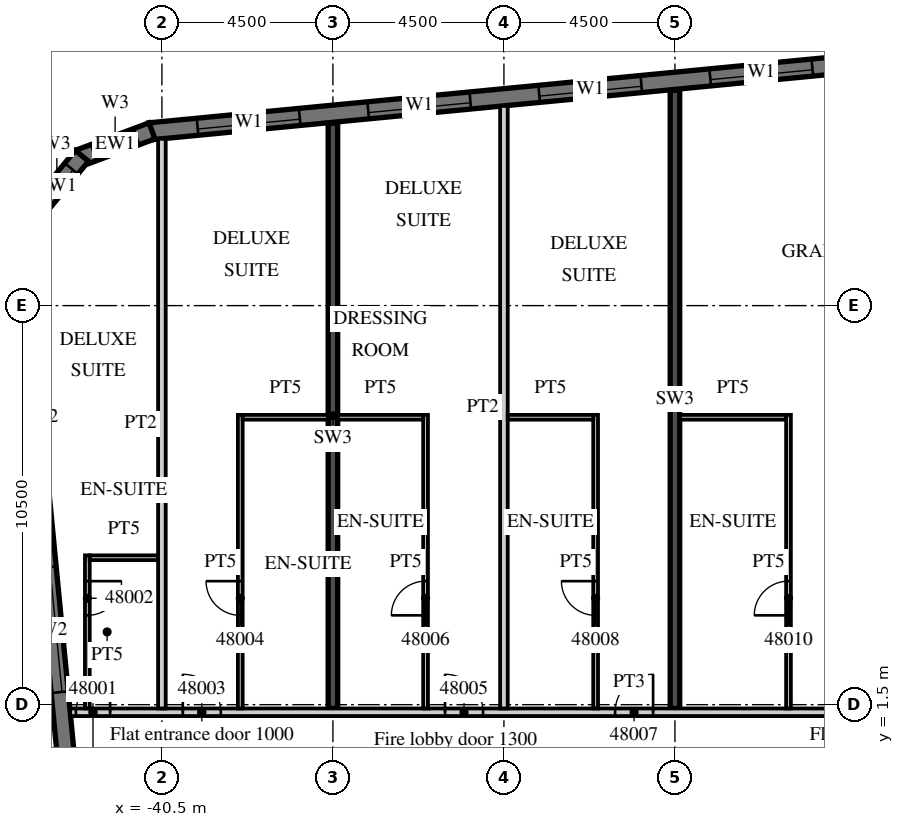
"""IFC4 building model, lengths in metres.
Left out: names, types, materials, properties, quantities, classifications, styles, units other than length and angle.
Written with IfcOpenShell. Run it as: python <this file> out.ifc"""

import sys

from ifc_helpers import new_model, si_unit, direction, frame, frame_2d, origin, place, context, subcontext, project, spatial, polyline, rectangle, outline, extrude, element, fill, save


model = new_model("IFC4")
c1 = context("Model", 3, precision=1e-05, world=origin(), true_north=direction((0.0, 1.0)))
c2 = subcontext(c1, "Body", "Model", "MODEL_VIEW")
j1 = project(units=[si_unit("LENGTHUNIT", "METRE"), si_unit("PLANEANGLEUNIT", "RADIAN")], contexts=[c1])
p1 = place(None, origin())
s1 = spatial("IfcSite", under=j1, at=p1, CompositionType="ELEMENT")
p2 = place(p1, origin())
s2 = spatial("IfcBuilding", under=s1, at=p2, CompositionType="ELEMENT")
p3 = place(p2, frame((0.0, 0.0, 199.9)))
s3 = spatial("IfcBuildingStorey", under=s2, at=p3, CompositionType="ELEMENT", Elevation=199.9)
p4 = place(p3, frame((-36.0, 1.4, 0.0), z_axis=(0.0, 0.0, 1.0), x_axis=(0.0, 1.0, 0.0)))
e1 = element("IfcWall", 1, at=p4, inside=s3, PredefinedType="SHEAR", context=c2, shape_type="SweptSolid", body=[
    extrude(rectangle(XDim=15.401, YDim=0.25, at=frame_2d((7.701, 0.0))), origin(), (0.0, 0.0, 1.0), 3.3),
])
p5 = place(p3, frame((-27.0, 1.4, 0.0), z_axis=(0.0, 0.0, 1.0), x_axis=(0.0, 1.0, 0.0)))
e2 = element("IfcWall", 2, at=p5, inside=s3, PredefinedType="SHEAR", context=c2, shape_type="SweptSolid", body=[
    extrude(rectangle(XDim=16.268, YDim=0.25, at=frame_2d((8.134, 0.0))), origin(), (0.0, 0.0, 1.0), 3.3),
])
p6 = place(p3, frame((-44.214, 12.466, 0.0), z_axis=(0.0, 0.0, 1.0), x_axis=(0.095847314626, -0.995396047952, 0.0)))
e3 = element("IfcWall", 3, at=p6, inside=s3, PredefinedType="SOLIDWALL", context=c2, shape_type="SweptSolid", body=[
    extrude(rectangle(XDim=34.0, YDim=0.45, at=frame_2d((17.0, 0.0))), origin(), (0.0, 0.0, 1.0), 3.02),
])
p7 = place(p6, frame((2.865, 0.0, 0.45)))
e4 = element("IfcOpeningElement", 4, at=p7, cuts=e3, PredefinedType="OPENING", context=c2, shape_type="SweptSolid", body=[
    extrude(rectangle(XDim=3.3, YDim=2.25, at=frame_2d((1.65, 1.125))), frame((0.0, 0.235, 0.0), z_axis=(0.0, -1.0, 0.0), x_axis=(1.0, 0.0, 0.0)), (0.0, 0.0, 1.0), 0.47),
])
p8 = place(p6, frame((7.386, 0.0, 0.45)))
e5 = element("IfcOpeningElement", 5, at=p8, cuts=e3, PredefinedType="OPENING", context=c2, shape_type="SweptSolid", body=[
    extrude(rectangle(XDim=3.3, YDim=2.25, at=frame_2d((1.65, 1.125))), frame((0.0, 0.235, 0.0), z_axis=(0.0, -1.0, 0.0), x_axis=(1.0, 0.0, 0.0)), (0.0, 0.0, 1.0), 0.47),
])
p9 = place(p3, frame((13.521, 21.817, 0.0), z_axis=(0.0, 0.0, 1.0), x_axis=(-0.995396508751, -0.095842529008, 0.0)))
e6 = element("IfcWall", 6, at=p9, inside=s3, PredefinedType="SOLIDWALL", context=c2, shape_type="SweptSolid", body=[
    extrude(rectangle(XDim=54.591, YDim=0.45, at=frame_2d((27.296, 0.0))), origin(), (0.0, 0.0, 1.0), 3.02),
])
p10 = place(p9, frame((0.91, 0.0, 0.45)))
e7 = element("IfcOpeningElement", 7, at=p10, cuts=e6, PredefinedType="OPENING", context=c2, shape_type="SweptSolid", body=[
    extrude(rectangle(XDim=2.7, YDim=2.25, at=frame_2d((1.35, 1.125))), frame((0.0, 0.235, 0.0), z_axis=(0.0, -1.0, 0.0), x_axis=(1.0, 0.0, 0.0)), (0.0, 0.0, 1.0), 0.47),
])
p11 = place(p9, frame((5.431, 0.0, 0.45)))
e8 = element("IfcOpeningElement", 8, at=p11, cuts=e6, PredefinedType="OPENING", context=c2, shape_type="SweptSolid", body=[
    extrude(rectangle(XDim=2.7, YDim=2.25, at=frame_2d((1.35, 1.125))), frame((0.0, 0.235, 0.0), z_axis=(0.0, -1.0, 0.0), x_axis=(1.0, 0.0, 0.0)), (0.0, 0.0, 1.0), 0.47),
])
p12 = place(p9, frame((9.952, 0.0, 0.45)))
e9 = element("IfcOpeningElement", 9, at=p12, cuts=e6, PredefinedType="OPENING", context=c2, shape_type="SweptSolid", body=[
    extrude(rectangle(XDim=2.7, YDim=2.25, at=frame_2d((1.35, 1.125))), frame((0.0, 0.235, 0.0), z_axis=(0.0, -1.0, 0.0), x_axis=(1.0, 0.0, 0.0)), (0.0, 0.0, 1.0), 0.47),
])
p13 = place(p9, frame((14.473, 0.0, 0.45)))
e10 = element("IfcOpeningElement", 10, at=p13, cuts=e6, PredefinedType="OPENING", context=c2, shape_type="SweptSolid", body=[
    extrude(rectangle(XDim=2.7, YDim=2.25, at=frame_2d((1.35, 1.125))), frame((0.0, 0.235, 0.0), z_axis=(0.0, -1.0, 0.0), x_axis=(1.0, 0.0, 0.0)), (0.0, 0.0, 1.0), 0.47),
])
p14 = place(p9, frame((18.994, 0.0, 0.45)))
e11 = element("IfcOpeningElement", 11, at=p14, cuts=e6, PredefinedType="OPENING", context=c2, shape_type="SweptSolid", body=[
    extrude(rectangle(XDim=2.7, YDim=2.25, at=frame_2d((1.35, 1.125))), frame((0.0, 0.235, 0.0), z_axis=(0.0, -1.0, 0.0), x_axis=(1.0, 0.0, 0.0)), (0.0, 0.0, 1.0), 0.47),
])
p15 = place(p9, frame((23.514, 0.0, 0.45)))
e12 = element("IfcOpeningElement", 12, at=p15, cuts=e6, PredefinedType="OPENING", context=c2, shape_type="SweptSolid", body=[
    extrude(rectangle(XDim=2.7, YDim=2.25, at=frame_2d((1.35, 1.125))), frame((0.0, 0.235, 0.0), z_axis=(0.0, -1.0, 0.0), x_axis=(1.0, 0.0, 0.0)), (0.0, 0.0, 1.0), 0.47),
])
p16 = place(p9, frame((28.035, 0.0, 0.45)))
e13 = element("IfcOpeningElement", 13, at=p16, cuts=e6, PredefinedType="OPENING", context=c2, shape_type="SweptSolid", body=[
    extrude(rectangle(XDim=2.7, YDim=2.25, at=frame_2d((1.35, 1.125))), frame((0.0, 0.235, 0.0), z_axis=(0.0, -1.0, 0.0), x_axis=(1.0, 0.0, 0.0)), (0.0, 0.0, 1.0), 0.47),
])
p17 = place(p9, frame((32.556, 0.0, 0.45)))
e14 = element("IfcOpeningElement", 14, at=p17, cuts=e6, PredefinedType="OPENING", context=c2, shape_type="SweptSolid", body=[
    extrude(rectangle(XDim=2.7, YDim=2.25, at=frame_2d((1.35, 1.125))), frame((0.0, 0.235, 0.0), z_axis=(0.0, -1.0, 0.0), x_axis=(1.0, 0.0, 0.0)), (0.0, 0.0, 1.0), 0.47),
])
p18 = place(p9, frame((37.077, 0.0, 0.45)))
e15 = element("IfcOpeningElement", 15, at=p18, cuts=e6, PredefinedType="OPENING", context=c2, shape_type="SweptSolid", body=[
    extrude(rectangle(XDim=2.7, YDim=2.25, at=frame_2d((1.35, 1.125))), frame((0.0, 0.235, 0.0), z_axis=(0.0, -1.0, 0.0), x_axis=(1.0, 0.0, 0.0)), (0.0, 0.0, 1.0), 0.47),
])
p19 = place(p9, frame((41.598, 0.0, 0.45)))
e16 = element("IfcOpeningElement", 16, at=p19, cuts=e6, PredefinedType="OPENING", context=c2, shape_type="SweptSolid", body=[
    extrude(rectangle(XDim=2.7, YDim=2.25, at=frame_2d((1.35, 1.125))), frame((0.0, 0.235, 0.0), z_axis=(0.0, -1.0, 0.0), x_axis=(1.0, 0.0, 0.0)), (0.0, 0.0, 1.0), 0.47),
])
p20 = place(p9, frame((46.118, 0.0, 0.45)))
e17 = element("IfcOpeningElement", 17, at=p20, cuts=e6, PredefinedType="OPENING", context=c2, shape_type="SweptSolid", body=[
    extrude(rectangle(XDim=2.7, YDim=2.25, at=frame_2d((1.35, 1.125))), frame((0.0, 0.235, 0.0), z_axis=(0.0, -1.0, 0.0), x_axis=(1.0, 0.0, 0.0)), (0.0, 0.0, 1.0), 0.47),
])
p21 = place(p9, frame((50.629, 0.0, 0.45)))
e18 = element("IfcOpeningElement", 18, at=p21, cuts=e6, PredefinedType="OPENING", context=c2, shape_type="SweptSolid", body=[
    extrude(rectangle(XDim=2.7, YDim=2.25, at=frame_2d((1.35, 1.125))), frame((0.0, 0.235, 0.0), z_axis=(0.0, -1.0, 0.0), x_axis=(1.0, 0.0, 0.0)), (0.0, 0.0, 1.0), 0.47),
])
p22 = place(p3, frame((-40.761, 16.598, 0.0), z_axis=(0.0, 0.0, 1.0), x_axis=(-0.936677599948, -0.350192909346, 0.0)))
e19 = element("IfcWall", 19, at=p22, inside=s3, PredefinedType="SOLIDWALL", context=c2, shape_type="SweptSolid", body=[
    extrude(outline(polyline([(0.0, -0.225), (2.071, -0.225), (1.95, 0.225), (0.121, 0.225), (0.0, -0.225)])), origin(), (0.0, 0.0, 1.0), 3.02),
])
p23 = place(p22, frame((0.435, 0.0, 0.45)))
e20 = element("IfcOpeningElement", 20, at=p23, cuts=e19, PredefinedType="OPENING", context=c2, shape_type="SweptSolid", body=[
    extrude(rectangle(XDim=1.2, YDim=2.25, at=frame_2d((0.6, 1.125))), frame((0.0, 0.235, 0.0), z_axis=(0.0, -1.0, 0.0), x_axis=(1.0, 0.0, 0.0)), (0.0, 0.0, 1.0), 0.47),
])
p24 = place(p3, frame((-42.606, 15.941, 0.0), z_axis=(0.0, 0.0, 1.0), x_axis=(-0.636116318187, -0.771593176315, 0.0)))
e21 = element("IfcWall", 21, at=p24, inside=s3, PredefinedType="SOLIDWALL", context=c2, shape_type="SweptSolid", body=[
    extrude(outline(polyline([(0.0, -0.225), (2.071, -0.225), (1.95, 0.225), (0.121, 0.225), (0.0, -0.225)])), origin(), (0.0, 0.0, 1.0), 3.02),
])
p25 = place(p24, frame((0.435, 0.0, 0.45)))
e22 = element("IfcOpeningElement", 22, at=p25, cuts=e21, PredefinedType="OPENING", context=c2, shape_type="SweptSolid", body=[
    extrude(rectangle(XDim=1.2, YDim=2.25, at=frame_2d((0.6, 1.125))), frame((0.0, 0.235, 0.0), z_axis=(0.0, -1.0, 0.0), x_axis=(1.0, 0.0, 0.0)), (0.0, 0.0, 1.0), 0.47),
])
p26 = place(p3, frame((-42.913, 1.3, 0.0), z_axis=(0.0, 0.0, 1.0), x_axis=(1.0, 0.0, 0.0)))
e23 = element("IfcWall", 23, at=p26, inside=s3, PredefinedType="PARTITIONING", context=c2, shape_type="SweptSolid", body=[
    extrude(rectangle(XDim=29.413, YDim=0.2, at=frame_2d((14.707, 0.0))), origin(), (0.0, 0.0, 1.0), 3.02),
])
p27 = place(p26, frame((0.15, 0.0, 0.0)))
e24 = element("IfcOpeningElement", 24, at=p27, cuts=e23, PredefinedType="OPENING", context=c2, shape_type="SweptSolid", body=[
    extrude(rectangle(XDim=0.9, YDim=2.1, at=frame_2d((0.45, 1.05))), frame((0.0, 0.11, 0.0), z_axis=(0.0, -1.0, 0.0), x_axis=(1.0, 0.0, 0.0)), (0.0, 0.0, 1.0), 0.22),
])
p28 = place(p26, frame((2.963, 0.0, 0.0)))
e25 = element("IfcOpeningElement", 25, at=p28, cuts=e23, PredefinedType="OPENING", context=c2, shape_type="SweptSolid", body=[
    extrude(rectangle(XDim=1.0, YDim=2.1, at=frame_2d((0.5, 1.05))), frame((0.0, 0.11, 0.0), z_axis=(0.0, -1.0, 0.0), x_axis=(1.0, 0.0, 0.0)), (0.0, 0.0, 1.0), 0.22),
])
p29 = place(p26, frame((9.863, 0.0, 0.0)))
e26 = element("IfcOpeningElement", 26, at=p29, cuts=e23, PredefinedType="OPENING", context=c2, shape_type="SweptSolid", body=[
    extrude(rectangle(XDim=1.0, YDim=2.1, at=frame_2d((0.5, 1.05))), frame((0.0, 0.11, 0.0), z_axis=(0.0, -1.0, 0.0), x_axis=(1.0, 0.0, 0.0)), (0.0, 0.0, 1.0), 0.22),
])
p30 = place(p26, frame((14.338, 0.0, 0.0)))
e27 = element("IfcOpeningElement", 27, at=p30, cuts=e23, PredefinedType="OPENING", context=c2, shape_type="SweptSolid", body=[
    extrude(rectangle(XDim=1.0, YDim=2.1, at=frame_2d((0.5, 1.05))), frame((0.0, 0.11, 0.0), z_axis=(0.0, -1.0, 0.0), x_axis=(1.0, 0.0, 0.0)), (0.0, 0.0, 1.0), 0.22),
])
p31 = place(p26, frame((21.275, 0.0, 0.0)))
e28 = element("IfcOpeningElement", 28, at=p31, cuts=e23, PredefinedType="OPENING", context=c2, shape_type="SweptSolid", body=[
    extrude(rectangle(XDim=1.2, YDim=2.1, at=frame_2d((0.6, 1.05))), frame((0.0, 0.11, 0.0), z_axis=(0.0, -1.0, 0.0), x_axis=(1.0, 0.0, 0.0)), (0.0, 0.0, 1.0), 0.22),
])
p32 = place(p26, frame((25.488, 0.0, 0.0)))
e29 = element("IfcOpeningElement", 29, at=p32, cuts=e23, PredefinedType="OPENING", context=c2, shape_type="SweptSolid", body=[
    extrude(rectangle(XDim=1.0, YDim=2.1, at=frame_2d((0.5, 1.05))), frame((0.0, 0.11, 0.0), z_axis=(0.0, -1.0, 0.0), x_axis=(1.0, 0.0, 0.0)), (0.0, 0.0, 1.0), 0.22),
])
p33 = place(p3, frame((-40.5, 1.4, 0.0), z_axis=(0.0, 0.0, 1.0), x_axis=(0.0, 1.0, 0.0)))
e30 = element("IfcWall", 30, at=p33, inside=s3, PredefinedType="PARTITIONING", context=c2, shape_type="SweptSolid", body=[
    extrude(rectangle(XDim=14.99, YDim=0.2, at=frame_2d((7.495, 0.0))), origin(), (0.0, 0.0, 1.0), 3.02),
])
p34 = place(p3, frame((-42.462, 1.4, 0.0), z_axis=(0.0, 0.0, 1.0), x_axis=(0.0, 1.0, 0.0)))
e31 = element("IfcWall", 31, at=p34, inside=s3, PredefinedType="PARTITIONING", context=c2, shape_type="SweptSolid", body=[
    extrude(rectangle(XDim=4.028, YDim=0.125, at=frame_2d((2.014, 0.0))), origin(), (0.0, 0.0, 1.0), 3.02),
])
p35 = place(p34, frame((2.45, 0.0, 0.0)))
e32 = element("IfcOpeningElement", 32, at=p35, cuts=e31, PredefinedType="OPENING", context=c2, shape_type="SweptSolid", body=[
    extrude(rectangle(XDim=0.9, YDim=2.1, at=frame_2d((0.45, 1.05))), frame((0.0, 0.073, 0.0), z_axis=(0.0, -1.0, 0.0), x_axis=(1.0, 0.0, 0.0)), (0.0, 0.0, 1.0), 0.145),
])
p36 = place(p3, frame((-42.4, 5.366, 0.0), z_axis=(0.0, 0.0, 1.0), x_axis=(1.0, 0.0, 0.0)))
e33 = element("IfcWall", 33, at=p36, inside=s3, PredefinedType="PARTITIONING", context=c2, shape_type="SweptSolid", body=[
    extrude(rectangle(XDim=1.8, YDim=0.125, at=frame_2d((0.9, 0.0))), origin(), (0.0, 0.0, 1.0), 3.02),
])
p37 = place(p3, frame((-38.438, 1.4, 0.0), z_axis=(0.0, 0.0, 1.0), x_axis=(0.0, 1.0, 0.0)))
e34 = element("IfcWall", 34, at=p37, inside=s3, PredefinedType="PARTITIONING", context=c2, shape_type="SweptSolid", body=[
    extrude(rectangle(XDim=7.725, YDim=0.125, at=frame_2d((3.863, 0.0))), origin(), (0.0, 0.0, 1.0), 3.02),
])
p38 = place(p37, frame((2.45, 0.0, 0.0)))
e35 = element("IfcOpeningElement", 35, at=p38, cuts=e34, PredefinedType="OPENING", context=c2, shape_type="SweptSolid", body=[
    extrude(rectangle(XDim=0.9, YDim=2.1, at=frame_2d((0.45, 1.05))), frame((0.0, 0.073, 0.0), z_axis=(0.0, -1.0, 0.0), x_axis=(1.0, 0.0, 0.0)), (0.0, 0.0, 1.0), 0.145),
])
p39 = place(p3, frame((-38.375, 9.062, 0.0), z_axis=(0.0, 0.0, 1.0), x_axis=(1.0, 0.0, 0.0)))
e36 = element("IfcWall", 36, at=p39, inside=s3, PredefinedType="PARTITIONING", context=c2, shape_type="SweptSolid", body=[
    extrude(rectangle(XDim=2.25, YDim=0.125, at=frame_2d((1.125, 0.0))), origin(), (0.0, 0.0, 1.0), 3.02),
])
p40 = place(p3, frame((-31.5, 1.4, 0.0), z_axis=(0.0, 0.0, 1.0), x_axis=(0.0, 1.0, 0.0)))
e37 = element("IfcWall", 37, at=p40, inside=s3, PredefinedType="PARTITIONING", context=c2, shape_type="SweptSolid", body=[
    extrude(rectangle(XDim=15.856, YDim=0.2, at=frame_2d((7.928, 0.0))), origin(), (0.0, 0.0, 1.0), 3.02),
])
p41 = place(p3, frame((-33.562, 1.4, 0.0), z_axis=(0.0, 0.0, 1.0), x_axis=(0.0, 1.0, 0.0)))
e38 = element("IfcWall", 38, at=p41, inside=s3, PredefinedType="PARTITIONING", context=c2, shape_type="SweptSolid", body=[
    extrude(rectangle(XDim=7.725, YDim=0.125, at=frame_2d((3.863, 0.0))), origin(), (0.0, 0.0, 1.0), 3.02),
])
p42 = place(p41, frame((2.45, 0.0, 0.0)))
e39 = element("IfcOpeningElement", 39, at=p42, cuts=e38, PredefinedType="OPENING", context=c2, shape_type="SweptSolid", body=[
    extrude(rectangle(XDim=0.9, YDim=2.1, at=frame_2d((0.45, 1.05))), frame((0.0, 0.073, 0.0), z_axis=(0.0, -1.0, 0.0), x_axis=(1.0, 0.0, 0.0)), (0.0, 0.0, 1.0), 0.145),
])
p43 = place(p3, frame((-35.875, 9.062, 0.0), z_axis=(0.0, 0.0, 1.0), x_axis=(1.0, 0.0, 0.0)))
e40 = element("IfcWall", 40, at=p43, inside=s3, PredefinedType="PARTITIONING", context=c2, shape_type="SweptSolid", body=[
    extrude(rectangle(XDim=2.25, YDim=0.125, at=frame_2d((1.125, 0.0))), origin(), (0.0, 0.0, 1.0), 3.02),
])
p44 = place(p3, frame((-29.087, 1.4, 0.0), z_axis=(0.0, 0.0, 1.0), x_axis=(0.0, 1.0, 0.0)))
e41 = element("IfcWall", 41, at=p44, inside=s3, PredefinedType="PARTITIONING", context=c2, shape_type="SweptSolid", body=[
    extrude(rectangle(XDim=7.725, YDim=0.125, at=frame_2d((3.863, 0.0))), origin(), (0.0, 0.0, 1.0), 3.02),
])
p45 = place(p44, frame((2.45, 0.0, 0.0)))
e42 = element("IfcOpeningElement", 42, at=p45, cuts=e41, PredefinedType="OPENING", context=c2, shape_type="SweptSolid", body=[
    extrude(rectangle(XDim=0.9, YDim=2.1, at=frame_2d((0.45, 1.05))), frame((0.0, 0.073, 0.0), z_axis=(0.0, -1.0, 0.0), x_axis=(1.0, 0.0, 0.0)), (0.0, 0.0, 1.0), 0.145),
])
p46 = place(p3, frame((-31.4, 9.062, 0.0), z_axis=(0.0, 0.0, 1.0), x_axis=(1.0, 0.0, 0.0)))
e43 = element("IfcWall", 43, at=p46, inside=s3, PredefinedType="PARTITIONING", context=c2, shape_type="SweptSolid", body=[
    extrude(rectangle(XDim=2.25, YDim=0.125, at=frame_2d((1.125, 0.0))), origin(), (0.0, 0.0, 1.0), 3.02),
])
p47 = place(p3, frame((-24.012, 1.4, 0.0), z_axis=(0.0, 0.0, 1.0), x_axis=(0.0, 1.0, 0.0)))
e44 = element("IfcWall", 44, at=p47, inside=s3, PredefinedType="PARTITIONING", context=c2, shape_type="SweptSolid", body=[
    extrude(rectangle(XDim=7.725, YDim=0.125, at=frame_2d((3.863, 0.0))), origin(), (0.0, 0.0, 1.0), 3.02),
])
p48 = place(p47, frame((2.45, 0.0, 0.0)))
e45 = element("IfcOpeningElement", 45, at=p48, cuts=e44, PredefinedType="OPENING", context=c2, shape_type="SweptSolid", body=[
    extrude(rectangle(XDim=0.9, YDim=2.1, at=frame_2d((0.45, 1.05))), frame((0.0, 0.073, 0.0), z_axis=(0.0, -1.0, 0.0), x_axis=(1.0, 0.0, 0.0)), (0.0, 0.0, 1.0), 0.145),
])
p49 = place(p3, frame((-26.875, 9.062, 0.0), z_axis=(0.0, 0.0, 1.0), x_axis=(1.0, 0.0, 0.0)))
e46 = element("IfcWall", 46, at=p49, inside=s3, PredefinedType="PARTITIONING", context=c2, shape_type="SweptSolid", body=[
    extrude(rectangle(XDim=2.8, YDim=0.125, at=frame_2d((1.4, 0.0))), origin(), (0.0, 0.0, 1.0), 3.02),
])
p50 = place(p8, origin())
e47 = element("IfcWindow", 47, at=p50, inside=s3, PartitioningType="SINGLE_PANEL", PredefinedType="WINDOW", context=c2, shape_type="SweptSolid", body=[
    extrude(rectangle(XDim=3.3, YDim=2.25, at=frame_2d((1.65, 1.125))), frame((0.0, 0.09, 0.0), z_axis=(0.0, -1.0, 0.0), x_axis=(1.0, 0.0, 0.0)), (0.0, 0.0, 1.0), 0.06),
])
fill(e5, e47)
p51 = place(p18, origin())
e48 = element("IfcWindow", 48, at=p51, inside=s3, PartitioningType="SINGLE_PANEL", PredefinedType="WINDOW", context=c2, shape_type="SweptSolid", body=[
    extrude(rectangle(XDim=2.7, YDim=2.25, at=frame_2d((1.35, 1.125))), frame((0.0, 0.09, 0.0), z_axis=(0.0, -1.0, 0.0), x_axis=(1.0, 0.0, 0.0)), (0.0, 0.0, 1.0), 0.06),
])
fill(e15, e48)
p52 = place(p19, origin())
e49 = element("IfcWindow", 49, at=p52, inside=s3, PartitioningType="SINGLE_PANEL", PredefinedType="WINDOW", context=c2, shape_type="SweptSolid", body=[
    extrude(rectangle(XDim=2.7, YDim=2.25, at=frame_2d((1.35, 1.125))), frame((0.0, 0.09, 0.0), z_axis=(0.0, -1.0, 0.0), x_axis=(1.0, 0.0, 0.0)), (0.0, 0.0, 1.0), 0.06),
])
fill(e16, e49)
p53 = place(p20, origin())
e50 = element("IfcWindow", 50, at=p53, inside=s3, PartitioningType="SINGLE_PANEL", PredefinedType="WINDOW", context=c2, shape_type="SweptSolid", body=[
    extrude(rectangle(XDim=2.7, YDim=2.25, at=frame_2d((1.35, 1.125))), frame((0.0, 0.09, 0.0), z_axis=(0.0, -1.0, 0.0), x_axis=(1.0, 0.0, 0.0)), (0.0, 0.0, 1.0), 0.06),
])
fill(e17, e50)
p54 = place(p21, origin())
e51 = element("IfcWindow", 51, at=p54, inside=s3, PartitioningType="SINGLE_PANEL", PredefinedType="WINDOW", context=c2, shape_type="SweptSolid", body=[
    extrude(rectangle(XDim=2.7, YDim=2.25, at=frame_2d((1.35, 1.125))), frame((0.0, 0.09, 0.0), z_axis=(0.0, -1.0, 0.0), x_axis=(1.0, 0.0, 0.0)), (0.0, 0.0, 1.0), 0.06),
])
fill(e18, e51)
p55 = place(p23, origin())
e52 = element("IfcWindow", 52, at=p55, inside=s3, PartitioningType="SINGLE_PANEL", PredefinedType="WINDOW", context=c2, shape_type="SweptSolid", body=[
    extrude(rectangle(XDim=1.2, YDim=2.25, at=frame_2d((0.6, 1.125))), frame((0.0, 0.09, 0.0), z_axis=(0.0, -1.0, 0.0), x_axis=(1.0, 0.0, 0.0)), (0.0, 0.0, 1.0), 0.06),
])
fill(e20, e52)
p56 = place(p25, origin())
e53 = element("IfcWindow", 53, at=p56, inside=s3, PartitioningType="SINGLE_PANEL", PredefinedType="WINDOW", context=c2, shape_type="SweptSolid", body=[
    extrude(rectangle(XDim=1.2, YDim=2.25, at=frame_2d((0.6, 1.125))), frame((0.0, 0.09, 0.0), z_axis=(0.0, -1.0, 0.0), x_axis=(1.0, 0.0, 0.0)), (0.0, 0.0, 1.0), 0.06),
])
fill(e22, e53)
p57 = place(p27, origin())
e54 = element("IfcDoor", 54, at=p57, inside=s3, OperationType="SINGLE_SWING_RIGHT", PredefinedType="DOOR", context=c2, shape_type="SweptSolid", body=[
    extrude(rectangle(XDim=0.9, YDim=2.1, at=frame_2d((0.45, 1.05))), frame((0.0, 0.025, 0.0), z_axis=(0.0, -1.0, 0.0), x_axis=(1.0, 0.0, 0.0)), (0.0, 0.0, 1.0), 0.05),
])
fill(e24, e54)
p58 = place(p35, origin())
e55 = element("IfcDoor", 55, at=p58, inside=s3, OperationType="SINGLE_SWING_RIGHT", PredefinedType="DOOR", context=c2, shape_type="SweptSolid", body=[
    extrude(rectangle(XDim=0.9, YDim=2.1, at=frame_2d((0.45, 1.05))), frame((0.0, 0.025, 0.0), z_axis=(0.0, -1.0, 0.0), x_axis=(1.0, 0.0, 0.0)), (0.0, 0.0, 1.0), 0.05),
])
fill(e32, e55)
p59 = place(p28, origin())
e56 = element("IfcDoor", 56, at=p59, inside=s3, OperationType="SINGLE_SWING_LEFT", PredefinedType="DOOR", context=c2, shape_type="SweptSolid", body=[
    extrude(rectangle(XDim=1.0, YDim=2.1, at=frame_2d((0.5, 1.05))), frame((0.0, 0.025, 0.0), z_axis=(0.0, -1.0, 0.0), x_axis=(1.0, 0.0, 0.0)), (0.0, 0.0, 1.0), 0.05),
])
fill(e25, e56)
p60 = place(p38, origin())
e57 = element("IfcDoor", 57, at=p60, inside=s3, OperationType="SINGLE_SWING_RIGHT", PredefinedType="DOOR", context=c2, shape_type="SweptSolid", body=[
    extrude(rectangle(XDim=0.9, YDim=2.1, at=frame_2d((0.45, 1.05))), frame((0.0, 0.025, 0.0), z_axis=(0.0, -1.0, 0.0), x_axis=(1.0, 0.0, 0.0)), (0.0, 0.0, 1.0), 0.05),
])
fill(e35, e57)
p61 = place(p29, origin())
e58 = element("IfcDoor", 58, at=p61, inside=s3, OperationType="SINGLE_SWING_LEFT", PredefinedType="DOOR", context=c2, shape_type="SweptSolid", body=[
    extrude(rectangle(XDim=1.0, YDim=2.1, at=frame_2d((0.5, 1.05))), frame((0.0, 0.025, 0.0), z_axis=(0.0, -1.0, 0.0), x_axis=(1.0, 0.0, 0.0)), (0.0, 0.0, 1.0), 0.05),
])
fill(e26, e58)
p62 = place(p42, origin())
e59 = element("IfcDoor", 59, at=p62, inside=s3, OperationType="SINGLE_SWING_LEFT", PredefinedType="DOOR", context=c2, shape_type="SweptSolid", body=[
    extrude(rectangle(XDim=0.9, YDim=2.1, at=frame_2d((0.45, 1.05))), frame((0.0, 0.025, 0.0), z_axis=(0.0, -1.0, 0.0), x_axis=(1.0, 0.0, 0.0)), (0.0, 0.0, 1.0), 0.05),
])
fill(e39, e59)
p63 = place(p30, origin())
e60 = element("IfcDoor", 60, at=p63, inside=s3, OperationType="SINGLE_SWING_RIGHT", PredefinedType="DOOR", context=c2, shape_type="SweptSolid", body=[
    extrude(rectangle(XDim=1.0, YDim=2.1, at=frame_2d((0.5, 1.05))), frame((0.0, 0.025, 0.0), z_axis=(0.0, -1.0, 0.0), x_axis=(1.0, 0.0, 0.0)), (0.0, 0.0, 1.0), 0.05),
])
fill(e27, e60)
p64 = place(p45, origin())
e61 = element("IfcDoor", 61, at=p64, inside=s3, OperationType="SINGLE_SWING_RIGHT", PredefinedType="DOOR", context=c2, shape_type="SweptSolid", body=[
    extrude(rectangle(XDim=0.9, YDim=2.1, at=frame_2d((0.45, 1.05))), frame((0.0, 0.025, 0.0), z_axis=(0.0, -1.0, 0.0), x_axis=(1.0, 0.0, 0.0)), (0.0, 0.0, 1.0), 0.05),
])
fill(e42, e61)
p65 = place(p48, origin())
e62 = element("IfcDoor", 62, at=p65, inside=s3, OperationType="SINGLE_SWING_LEFT", PredefinedType="DOOR", context=c2, shape_type="SweptSolid", body=[
    extrude(rectangle(XDim=0.9, YDim=2.1, at=frame_2d((0.45, 1.05))), frame((0.0, 0.025, 0.0), z_axis=(0.0, -1.0, 0.0), x_axis=(1.0, 0.0, 0.0)), (0.0, 0.0, 1.0), 0.05),
])
fill(e45, e62)
save(model, sys.argv[1])
